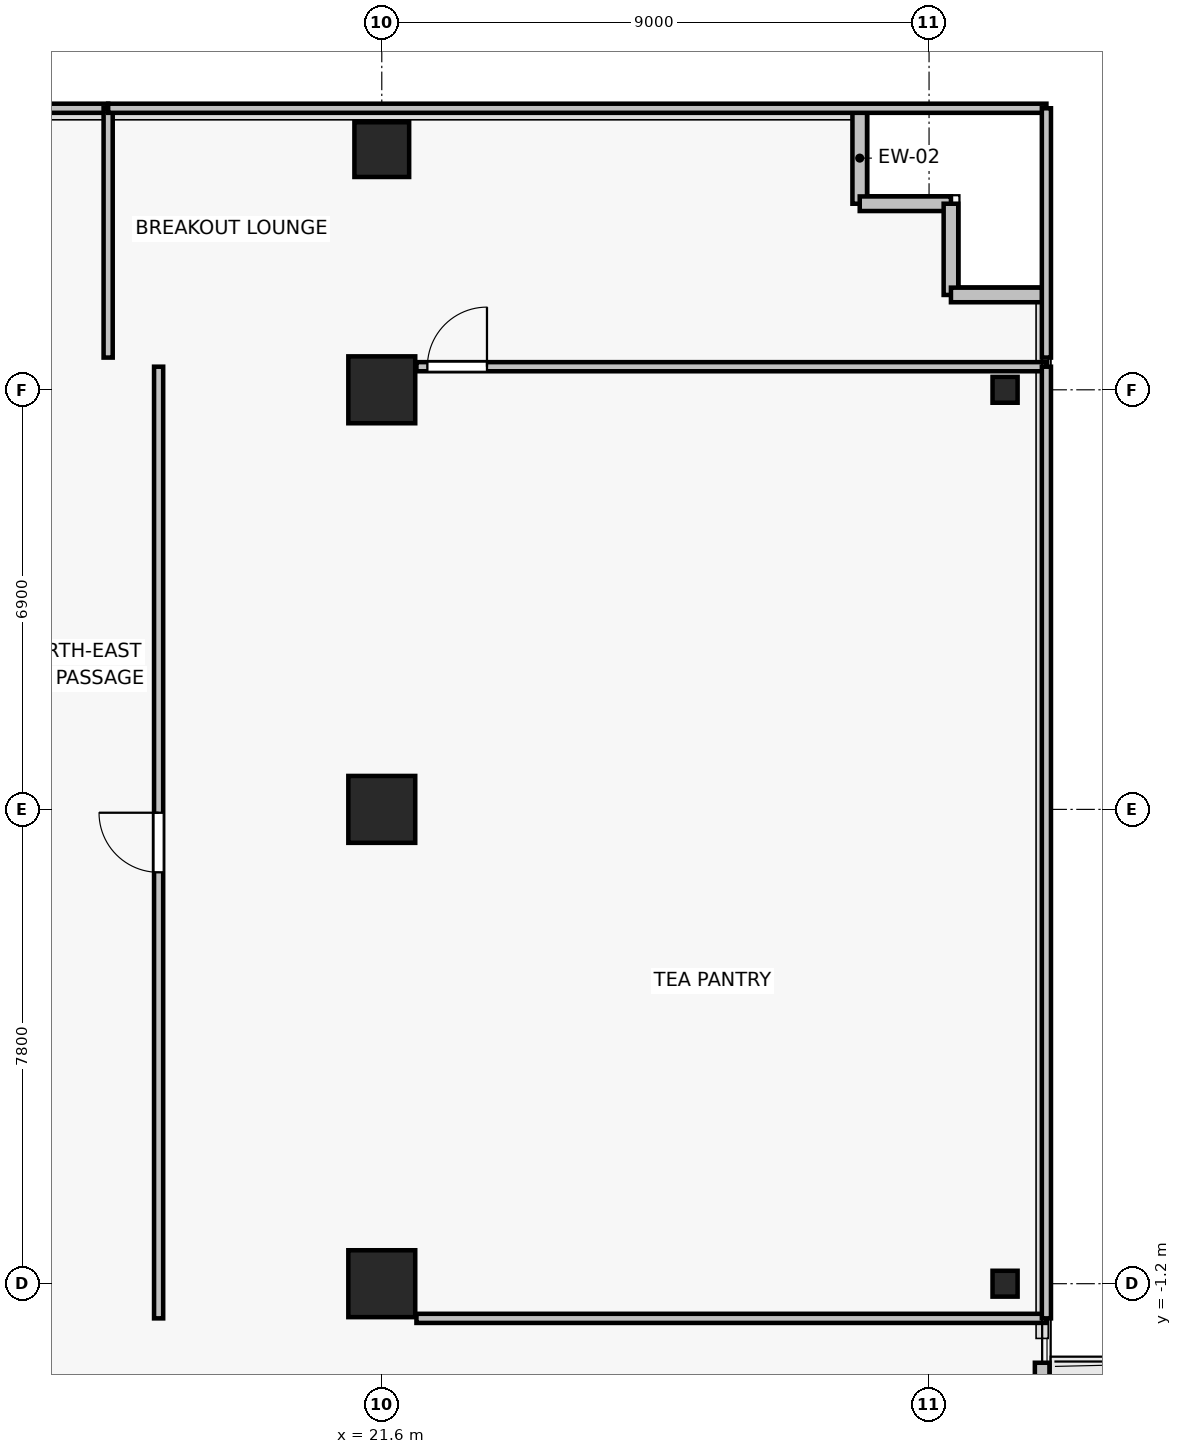
"""IFC4 building model, lengths in metres.
Left out: names, types, materials, properties, quantities, classifications, styles, units other than length and angle.
Written with IfcOpenShell. Run it as: python <this file> out.ifc"""

import sys

from ifc_helpers import new_model, si_unit, direction, frame, frame_2d, origin, origin_2d, place, context, subcontext, project, spatial, rectangle, i_section, extrude, source, transform, mapped, element, fill, save


model = new_model("IFC4")
c1 = context("Model", 3, precision=1e-05, world=origin(), true_north=direction((0.0, 1.0)))
c2 = subcontext(c1, "Body", "Model", "MODEL_VIEW")
j1 = project(units=[si_unit("LENGTHUNIT", "METRE"), si_unit("PLANEANGLEUNIT", "RADIAN")], contexts=[c1])
p1 = place(None, origin())
s1 = spatial("IfcSite", under=j1, at=p1, CompositionType="ELEMENT")
p2 = place(p1, origin())
s2 = spatial("IfcBuilding", under=s1, at=p2, CompositionType="ELEMENT")
p3 = place(p2, frame((0.0, 0.0, 57.1)))
s3 = spatial("IfcBuildingStorey", under=s2, at=p3, CompositionType="ELEMENT", Elevation=57.1)
for number, where, z_axis, x_axis in (
    (1, (21.6, -1.2, 0.0), (0.0, 0.0, 1.0), (1.0, 0.0, 0.0)),
    (2, (21.6, 6.6, 0.0), (0.0, 0.0, 1.0), (1.0, 0.0, 0.0)),
    (3, (21.6, 13.5, 0.0), (0.0, 0.0, 1.0), (1.0, 0.0, 0.0)),
):
    element("IfcColumn", number, at=place(p3, frame(where, z_axis=z_axis, x_axis=x_axis)), inside=s3, PredefinedType="COLUMN", context=c2, shape_type="SweptSolid", body=[
        extrude(rectangle(XDim=1.1, YDim=1.1, at=origin_2d()), origin(), (0.0, 0.0, 1.0), 3.3),
    ])
p4 = place(p3, frame((21.6, 17.45, 0.0), z_axis=(0.0, 0.0, 1.0), x_axis=(1.0, 0.0, 0.0)))
e4 = element("IfcColumn", 4, at=p4, inside=s3, PredefinedType="COLUMN", context=c2, shape_type="SweptSolid", body=[
    extrude(rectangle(XDim=0.9, YDim=0.9, at=origin_2d()), origin(), (0.0, 0.0, 1.0), 3.3),
])
for number, where, z_axis, x_axis in (
    (5, (31.85, -1.2, 0.0), (0.0, 0.0, 1.0), (1.0, 0.0, 0.0)),
    (6, (31.85, 13.5, 0.0), (0.0, 0.0, 1.0), (1.0, 0.0, 0.0)),
):
    element("IfcColumn", number, at=place(p3, frame(where, z_axis=z_axis, x_axis=x_axis)), inside=s3, PredefinedType="COLUMN", context=c2, shape_type="SweptSolid", body=[
        extrude(i_section(OverallWidth=0.412, OverallDepth=0.425, WebThickness=0.026, FlangeThickness=0.039, FilletRadius=0.015, at=origin_2d()), origin(), (0.0, 0.0, 1.0), 3.3),
    ])
p5 = place(p3, frame((32.46, -2.5, 0.0), z_axis=(0.0, 0.0, 1.0), x_axis=(0.0, -1.0, 0.0)))
e7 = element("IfcWall", 7, at=p5, inside=s3, PredefinedType="SOLIDWALL", context=c2, shape_type="SweptSolid", body=[
    extrude(rectangle(XDim=5.8, YDim=0.24, at=frame_2d((2.9, 0.0))), origin(), (0.0, 0.0, 1.0), 3.075),
])
p6 = place(p5, frame((0.696, 0.0, 0.0)))
e8 = element("IfcOpeningElement", 8, at=p6, cuts=e7, PredefinedType="OPENING", context=c2, shape_type="SweptSolid", body=[
    extrude(rectangle(XDim=1.0, YDim=2.2, at=frame_2d((0.5, 1.1))), frame((0.0, 0.13, 0.0), z_axis=(0.0, -1.0, 0.0), x_axis=(1.0, 0.0, 0.0)), (0.0, 0.0, 1.0), 0.26),
])
p7 = place(p5, frame((2.046, 0.0, 0.85)))
e9 = element("IfcOpeningElement", 9, at=p7, cuts=e7, PredefinedType="OPENING", context=c2, shape_type="SweptSolid", body=[
    extrude(rectangle(XDim=0.9, YDim=1.35, at=frame_2d((0.45, 0.675))), frame((0.0, 0.13, 0.0), z_axis=(0.0, -1.0, 0.0), x_axis=(1.0, 0.0, 0.0)), (0.0, 0.0, 1.0), 0.26),
])
for number, where, z_axis, x_axis in (
    (10, (29.46, 16.56, 0.0), (0.0, 0.0, 1.0), (0.0, 1.0, 0.0)),
    (11, (30.96, 16.56, 0.0), (0.0, 0.0, 1.0), (-1.0, 0.0, 0.0)),
    (12, (30.96, 15.06, 0.0), (0.0, 0.0, 1.0), (0.0, 1.0, 0.0)),
    (13, (32.46, 15.06, 0.0), (0.0, 0.0, 1.0), (-1.0, 0.0, 0.0)),
):
    element("IfcWall", number, at=place(p3, frame(where, z_axis=z_axis, x_axis=x_axis)), inside=s3, PredefinedType="SOLIDWALL", context=c2, shape_type="SweptSolid", body=[
        extrude(rectangle(XDim=1.5, YDim=0.24, at=frame_2d((0.75, 0.0))), origin(), (0.0, 0.0, 1.0), 3.075),
    ])
p8 = place(p3, frame((32.53, -1.77, 0.0), z_axis=(0.0, 0.0, 1.0), x_axis=(-1.0, 0.0, 0.0)))
e14 = element("IfcWall", 14, at=p8, inside=s3, PredefinedType="PARTITIONING", context=c2, shape_type="SweptSolid", body=[
    extrude(rectangle(XDim=10.36, YDim=0.15, at=frame_2d((5.18, 0.0))), origin(), (0.0, 0.0, 1.0), 2.465),
])
p9 = place(p3, frame((22.17, 13.88, 0.0), z_axis=(0.0, 0.0, 1.0), x_axis=(1.0, 0.0, 0.0)))
e15 = element("IfcWall", 15, at=p9, inside=s3, PredefinedType="PARTITIONING", context=c2, shape_type="SweptSolid", body=[
    extrude(rectangle(XDim=10.36, YDim=0.15, at=frame_2d((5.18, 0.0))), origin(), (0.0, 0.0, 1.0), 3.075),
])
p10 = place(p9, frame((0.18, 0.0, 0.0)))
e16 = element("IfcOpeningElement", 16, at=p10, cuts=e15, PredefinedType="OPENING", context=c2, shape_type="SweptSolid", body=[
    extrude(rectangle(XDim=0.98, YDim=2.15, at=frame_2d((0.49, 1.075))), frame((0.0, 0.085, 0.0), z_axis=(0.0, -1.0, 0.0), x_axis=(1.0, 0.0, 0.0)), (0.0, 0.0, 1.0), 0.17),
])
p11 = place(p3, frame((17.93, -1.77, 0.0), z_axis=(0.0, 0.0, 1.0), x_axis=(0.0, 1.0, 0.0)))
e17 = element("IfcWall", 17, at=p11, inside=s3, PredefinedType="PARTITIONING", context=c2, shape_type="SweptSolid", body=[
    extrude(rectangle(XDim=15.65, YDim=0.15, at=frame_2d((7.825, 0.0))), origin(), (0.0, 0.0, 1.0), 2.465),
])
p12 = place(p11, frame((7.335, 0.0, 0.0)))
e18 = element("IfcOpeningElement", 18, at=p12, cuts=e17, PredefinedType="OPENING", context=c2, shape_type="SweptSolid", body=[
    extrude(rectangle(XDim=0.98, YDim=2.15, at=frame_2d((0.49, 1.075))), frame((0.0, 0.085, 0.0), z_axis=(0.0, -1.0, 0.0), x_axis=(1.0, 0.0, 0.0)), (0.0, 0.0, 1.0), 0.17),
])
p13 = place(p3, frame((32.53, 13.88, 0.0), z_axis=(0.0, 0.0, 1.0), x_axis=(0.0, -1.0, 0.0)))
e19 = element("IfcWall", 19, at=p13, inside=s3, PredefinedType="PARTITIONING", context=c2, shape_type="SweptSolid", body=[
    extrude(rectangle(XDim=15.65, YDim=0.15, at=frame_2d((7.825, 0.0))), origin(), (0.0, 0.0, 1.0), 3.075),
])
p14 = place(p3, frame((-28.53, 18.13, 0.0), z_axis=(0.0, 0.0, 1.0), x_axis=(1.0, 0.0, 0.0)))
e20 = element("IfcWall", 20, at=p14, inside=s3, PredefinedType="PARTITIONING", context=c2, shape_type="SweptSolid", body=[
    extrude(rectangle(XDim=45.63, YDim=0.15, at=frame_2d((22.815, 0.0))), origin(), (0.0, 0.0, 1.0), 3.075),
])
p15 = place(p3, frame((17.1, 18.13, 0.0), z_axis=(0.0, 0.0, 1.0), x_axis=(0.0, -1.0, 0.0)))
e21 = element("IfcWall", 21, at=p15, inside=s3, PredefinedType="PARTITIONING", context=c2, shape_type="SweptSolid", body=[
    extrude(rectangle(XDim=4.1, YDim=0.15, at=frame_2d((2.05, 0.0))), origin(), (0.0, 0.0, 1.0), 2.465),
])
p16 = place(p3, frame((17.1, 18.13, 0.0), z_axis=(0.0, 0.0, 1.0), x_axis=(1.0, 0.0, 0.0)))
e22 = element("IfcWall", 22, at=p16, inside=s3, PredefinedType="PARTITIONING", context=c2, shape_type="SweptSolid", body=[
    extrude(rectangle(XDim=15.43, YDim=0.15, at=frame_2d((7.715, 0.0))), origin(), (0.0, 0.0, 1.0), 3.075),
])
p17 = place(p3, frame((32.53, 18.13, 0.0), z_axis=(0.0, 0.0, 1.0), x_axis=(0.0, -1.0, 0.0)))
e23 = element("IfcWall", 23, at=p17, inside=s3, PredefinedType="PARTITIONING", context=c2, shape_type="SweptSolid", body=[
    extrude(rectangle(XDim=4.1, YDim=0.15, at=frame_2d((2.05, 0.0))), origin(), (0.0, 0.0, 1.0), 3.075),
])
m1 = source(origin(), c2, "Body", "SweptSolid", [
    extrude(rectangle(XDim=0.98, YDim=2.15, at=frame_2d((0.49, 1.075))), frame((0.0, 0.025, 0.0), z_axis=(0.0, -1.0, 0.0), x_axis=(1.0, 0.0, 0.0)), (0.0, 0.0, 1.0), 0.05),
])
p18 = place(p12, origin())
e24 = element("IfcDoor", 24, at=p18, inside=s3, OperationType="SINGLE_SWING_RIGHT", PredefinedType="DOOR", context=c2, shape_type="MappedRepresentation", body=[
    mapped(m1, transform((0.0, 0.0, 0.0), x_axis=(1.0, 0.0, 0.0), y_axis=(0.0, 1.0, 0.0), z_axis=(0.0, 0.0, 1.0), scale=1.0)),
])
fill(e18, e24)
p19 = place(p10, origin())
e25 = element("IfcDoor", 25, at=p19, inside=s3, OperationType="SINGLE_SWING_RIGHT", PredefinedType="DOOR", context=c2, shape_type="MappedRepresentation", body=[
    mapped(m1, transform((0.0, 0.0, 0.0), x_axis=(1.0, 0.0, 0.0), y_axis=(0.0, 1.0, 0.0), z_axis=(0.0, 0.0, 1.0), scale=1.0)),
])
fill(e16, e25)
save(model, sys.argv[1])
